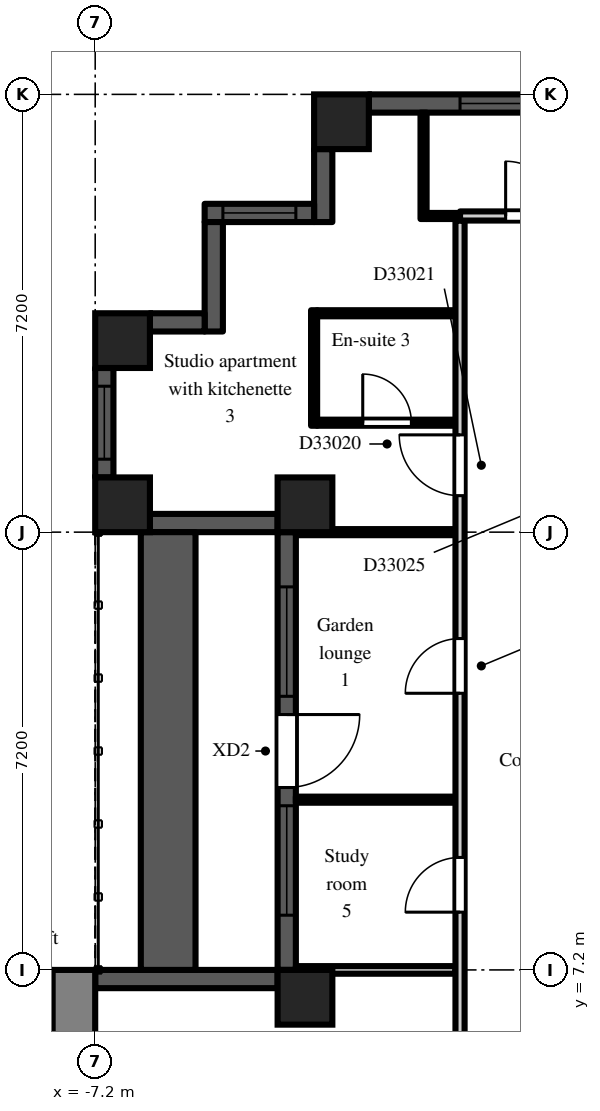
"""IFC4 building model, lengths in metres.
Left out: names, types, materials, properties, quantities, classifications, styles, units other than length and angle.
Written with IfcOpenShell. Run it as: python <this file> out.ifc"""

import sys

from ifc_helpers import new_model, si_unit, direction, frame, frame_2d, origin, origin_2d, place, context, subcontext, project, spatial, rectangle, extrude, element, fill, save


model = new_model("IFC4")
c1 = context("Model", 3, precision=1e-05, world=origin(), true_north=direction((0.0, 1.0)))
c2 = subcontext(c1, "Body", "Model", "MODEL_VIEW")
j1 = project(units=[si_unit("LENGTHUNIT", "METRE"), si_unit("PLANEANGLEUNIT", "RADIAN")], contexts=[c1])
p1 = place(None, origin())
s1 = spatial("IfcSite", under=j1, at=p1, CompositionType="ELEMENT")
p2 = place(p1, origin())
s2 = spatial("IfcBuilding", under=s1, at=p2, CompositionType="ELEMENT")
p3 = place(p2, frame((0.0, 0.0, 231.9)))
s3 = spatial("IfcBuildingStorey", under=s2, at=p3, CompositionType="ELEMENT", Elevation=231.9)
for number, where, z_axis, x_axis in (
    (1, (-6.75, 14.85, 0.0), (0.0, 0.0, 1.0), (1.0, 0.0, 0.0)),
    (2, (-6.75, 17.55, 0.0), (0.0, 0.0, 1.0), (1.0, 0.0, 0.0)),
    (3, (-3.75, 6.75, 0.0), (0.0, 0.0, 1.0), (1.0, 0.0, 0.0)),
    (4, (-3.75, 14.85, 0.0), (0.0, 0.0, 1.0), (1.0, 0.0, 0.0)),
    (5, (-3.15, 21.15, 0.0), (0.0, 0.0, 1.0), (1.0, 0.0, 0.0)),
):
    element("IfcColumn", number, at=place(p3, frame(where, z_axis=z_axis, x_axis=x_axis)), inside=s3, PredefinedType="COLUMN", context=c2, shape_type="SweptSolid", body=[
        extrude(rectangle(XDim=0.9, YDim=0.9, at=origin_2d()), origin(), (0.0, 0.0, 1.0), 3.0),
    ])
p4 = place(p3, frame((2.7, 21.45, 0.0), z_axis=(0.0, 0.0, 1.0), x_axis=(-1.0, 0.0, 0.0)))
e6 = element("IfcWall", 6, at=p4, inside=s3, PredefinedType="SOLIDWALL", context=c2, shape_type="SweptSolid", body=[
    extrude(rectangle(XDim=5.4, YDim=0.3, at=frame_2d((2.7, 0.0))), origin(), (0.0, 0.0, 1.0), 2.3),
])
p5 = place(p4, frame((1.5, 0.0, 0.2)))
e7 = element("IfcOpeningElement", 7, at=p5, cuts=e6, PredefinedType="OPENING", context=c2, shape_type="SweptSolid", body=[
    extrude(rectangle(XDim=2.4, YDim=1.85, at=frame_2d((1.2, 0.925))), frame((0.0, 0.16, 0.0), z_axis=(0.0, -1.0, 0.0), x_axis=(1.0, 0.0, 0.0)), (0.0, 0.0, 1.0), 0.32),
])
p6 = place(p3, frame((-3.45, 20.7, 0.0), z_axis=(0.0, 0.0, 1.0), x_axis=(0.0, -1.0, 0.0)))
e8 = element("IfcWall", 8, at=p6, inside=s3, PredefinedType="SOLIDWALL", context=c2, shape_type="SweptSolid", body=[
    extrude(rectangle(XDim=1.2, YDim=0.3, at=frame_2d((0.6, 0.0))), origin(), (0.0, 0.0, 1.0), 2.6),
])
p7 = place(p3, frame((-3.6, 19.65, 0.0), z_axis=(0.0, 0.0, 1.0), x_axis=(-1.0, 0.0, 0.0)))
e9 = element("IfcWall", 9, at=p7, inside=s3, PredefinedType="SOLIDWALL", context=c2, shape_type="SweptSolid", body=[
    extrude(rectangle(XDim=1.8, YDim=0.3, at=frame_2d((0.9, 0.0))), origin(), (0.0, 0.0, 1.0), 2.6),
])
p8 = place(p7, frame((0.3, 0.0, 0.2)))
e10 = element("IfcOpeningElement", 10, at=p8, cuts=e9, PredefinedType="OPENING", context=c2, shape_type="SweptSolid", body=[
    extrude(rectangle(XDim=1.2, YDim=1.85, at=frame_2d((0.6, 0.925))), frame((0.0, 0.16, 0.0), z_axis=(0.0, -1.0, 0.0), x_axis=(1.0, 0.0, 0.0)), (0.0, 0.0, 1.0), 0.32),
])
p9 = place(p3, frame((-5.25, 19.5, 0.0), z_axis=(0.0, 0.0, 1.0), x_axis=(0.0, -1.0, 0.0)))
e11 = element("IfcWall", 11, at=p9, inside=s3, PredefinedType="SOLIDWALL", context=c2, shape_type="SweptSolid", body=[
    extrude(rectangle(XDim=1.8, YDim=0.3, at=frame_2d((0.9, 0.0))), origin(), (0.0, 0.0, 1.0), 2.6),
])
p10 = place(p3, frame((-5.4, 17.85, 0.0), z_axis=(0.0, 0.0, 1.0), x_axis=(-1.0, 0.0, 0.0)))
e12 = element("IfcWall", 12, at=p10, inside=s3, PredefinedType="SOLIDWALL", context=c2, shape_type="SweptSolid", body=[
    extrude(rectangle(XDim=0.9, YDim=0.3, at=frame_2d((0.45, 0.0))), origin(), (0.0, 0.0, 1.0), 2.6),
])
p11 = place(p3, frame((-7.05, 17.1, 0.0), z_axis=(0.0, 0.0, 1.0), x_axis=(0.0, -1.0, 0.0)))
e13 = element("IfcWall", 13, at=p11, inside=s3, PredefinedType="SOLIDWALL", context=c2, shape_type="SweptSolid", body=[
    extrude(rectangle(XDim=1.8, YDim=0.3, at=frame_2d((0.9, 0.0))), origin(), (0.0, 0.0, 1.0), 2.3),
])
p12 = place(p11, frame((0.3, 0.0, 0.2)))
e14 = element("IfcOpeningElement", 14, at=p12, cuts=e13, PredefinedType="OPENING", context=c2, shape_type="SweptSolid", body=[
    extrude(rectangle(XDim=1.2, YDim=1.85, at=frame_2d((0.6, 0.925))), frame((0.0, 0.16, 0.0), z_axis=(0.0, -1.0, 0.0), x_axis=(1.0, 0.0, 0.0)), (0.0, 0.0, 1.0), 0.32),
])
p13 = place(p3, frame((-6.3, 14.55, 0.0), z_axis=(0.0, 0.0, 1.0), x_axis=(1.0, 0.0, 0.0)))
e15 = element("IfcWall", 15, at=p13, inside=s3, PredefinedType="SOLIDWALL", context=c2, shape_type="SweptSolid", body=[
    extrude(rectangle(XDim=2.1, YDim=0.3, at=frame_2d((1.05, 0.0))), origin(), (0.0, 0.0, 1.0), 2.3),
])
p14 = place(p3, frame((-4.05, 14.4, 0.0), z_axis=(0.0, 0.0, 1.0), x_axis=(0.0, -1.0, 0.0)))
e16 = element("IfcWall", 16, at=p14, inside=s3, PredefinedType="SOLIDWALL", context=c2, shape_type="SweptSolid", body=[
    extrude(rectangle(XDim=7.2, YDim=0.3, at=frame_2d((3.6, 0.0))), origin(), (0.0, 0.0, 1.0), 2.3),
])
p15 = place(p14, frame((3.0, 0.0, 0.0)))
e17 = element("IfcOpeningElement", 17, at=p15, cuts=e16, PredefinedType="OPENING", context=c2, shape_type="SweptSolid", body=[
    extrude(rectangle(XDim=1.2, YDim=2.05, at=frame_2d((0.6, 1.025))), frame((0.0, 0.16, 0.0), z_axis=(0.0, -1.0, 0.0), x_axis=(1.0, 0.0, 0.0)), (0.0, 0.0, 1.0), 0.32),
])
p16 = place(p14, frame((0.9, 0.0, 0.2)))
e18 = element("IfcOpeningElement", 18, at=p16, cuts=e16, PredefinedType="OPENING", context=c2, shape_type="SweptSolid", body=[
    extrude(rectangle(XDim=1.8, YDim=1.85, at=frame_2d((0.9, 0.925))), frame((0.0, 0.16, 0.0), z_axis=(0.0, -1.0, 0.0), x_axis=(1.0, 0.0, 0.0)), (0.0, 0.0, 1.0), 0.32),
])
p17 = place(p14, frame((4.5, 0.0, 0.2)))
e19 = element("IfcOpeningElement", 19, at=p17, cuts=e16, PredefinedType="OPENING", context=c2, shape_type="SweptSolid", body=[
    extrude(rectangle(XDim=1.8, YDim=1.85, at=frame_2d((0.9, 0.925))), frame((0.0, 0.16, 0.0), z_axis=(0.0, -1.0, 0.0), x_axis=(1.0, 0.0, 0.0)), (0.0, 0.0, 1.0), 0.32),
])
p18 = place(p3, frame((-4.2, 7.05, 0.0), z_axis=(0.0, 0.0, 1.0), x_axis=(-1.0, 0.0, 0.0)))
e20 = element("IfcWall", 20, at=p18, inside=s3, PredefinedType="SOLIDWALL", context=c2, shape_type="SweptSolid", body=[
    extrude(rectangle(XDim=3.0, YDim=0.3, at=frame_2d((1.5, 0.0))), origin(), (0.0, 0.0, 1.0), 2.3),
])
p19 = place(p3, frame((-6.0, 7.2, 0.0), z_axis=(0.0, 0.0, 1.0), x_axis=(0.0, 1.0, 0.0)))
e21 = element("IfcWall", 21, at=p19, inside=s3, PredefinedType="PARAPET", context=c2, shape_type="SweptSolid", body=[
    extrude(rectangle(XDim=7.2, YDim=0.9, at=frame_2d((3.6, 0.0))), origin(), (0.0, 0.0, 1.0), 0.8),
])
p20 = place(p3, frame((-7.55, -7.2, 0.0), z_axis=(0.0, 0.0, 1.0), x_axis=(0.0, 1.0, 0.0)))
e22 = element("IfcWall", 22, at=p20, inside=s3, PredefinedType="SHEAR", context=c2, shape_type="SweptSolid", body=[
    extrude(rectangle(XDim=14.4, YDim=0.7, at=frame_2d((7.2, 0.0))), origin(), (0.0, 0.0, 1.0), 2.6),
])
p21 = place(p20, frame((6.0, 0.0, 0.0)))
e23 = element("IfcOpeningElement", 23, at=p21, cuts=e22, PredefinedType="OPENING", context=c2, shape_type="SweptSolid", body=[
    extrude(rectangle(XDim=2.4, YDim=2.2, at=frame_2d((1.2, 1.1))), frame((0.0, 0.36, 0.0), z_axis=(0.0, -1.0, 0.0), x_axis=(1.0, 0.0, 0.0)), (0.0, 0.0, 1.0), 0.72),
])
p22 = place(p3, frame((-3.9, 7.2, 0.0), z_axis=(0.0, 0.0, 1.0), x_axis=(1.0, 0.0, 0.0)))
e24 = element("IfcWall", 24, at=p22, inside=s3, PredefinedType="PARTITIONING", context=c2, shape_type="SweptSolid", body=[
    extrude(rectangle(XDim=2.625, YDim=0.125, at=frame_2d((1.312, 0.0))), origin(), (0.0, 0.0, 1.0), 2.6),
])
for number, where, z_axis, x_axis in (
    (25, (-3.9, 10.0, 0.0), (0.0, 0.0, 1.0), (1.0, 0.0, 0.0)),
    (26, (-3.9, 14.4, 0.0), (0.0, 0.0, 1.0), (1.0, 0.0, 0.0)),
):
    element("IfcWall", number, at=place(p3, frame(where, z_axis=z_axis, x_axis=x_axis)), inside=s3, PredefinedType="PARTITIONING", context=c2, shape_type="SweptSolid", body=[
        extrude(rectangle(XDim=2.625, YDim=0.1, at=frame_2d((1.312, 0.0))), origin(), (0.0, 0.0, 1.0), 2.6),
    ])
p23 = place(p3, frame((-3.6, 16.15, 0.0), z_axis=(0.0, 0.0, 1.0), x_axis=(0.0, 1.0, 0.0)))
e27 = element("IfcWall", 27, at=p23, inside=s3, PredefinedType="PARTITIONING", context=c2, shape_type="SweptSolid", body=[
    extrude(rectangle(XDim=1.9, YDim=0.1, at=frame_2d((0.95, 0.0))), origin(), (0.0, 0.0, 1.0), 2.6),
])
p24 = place(p3, frame((-3.55, 16.2, 0.0), z_axis=(0.0, 0.0, 1.0), x_axis=(1.0, 0.0, 0.0)))
e28 = element("IfcWall", 28, at=p24, inside=s3, PredefinedType="PARTITIONING", context=c2, shape_type="SweptSolid", body=[
    extrude(rectangle(XDim=2.275, YDim=0.1, at=frame_2d((1.138, 0.0))), origin(), (0.0, 0.0, 1.0), 2.6),
])
p25 = place(p24, frame((0.75, 0.0, 0.0)))
e29 = element("IfcOpeningElement", 29, at=p25, cuts=e28, PredefinedType="OPENING", context=c2, shape_type="SweptSolid", body=[
    extrude(rectangle(XDim=0.8, YDim=2.1, at=frame_2d((0.4, 1.05))), frame((0.0, 0.06, 0.0), z_axis=(0.0, -1.0, 0.0), x_axis=(1.0, 0.0, 0.0)), (0.0, 0.0, 1.0), 0.12),
])
p26 = place(p3, frame((-3.55, 18.0, 0.0), z_axis=(0.0, 0.0, 1.0), x_axis=(1.0, 0.0, 0.0)))
e30 = element("IfcWall", 30, at=p26, inside=s3, PredefinedType="PARTITIONING", context=c2, shape_type="SweptSolid", body=[
    extrude(rectangle(XDim=2.275, YDim=0.1, at=frame_2d((1.138, 0.0))), origin(), (0.0, 0.0, 1.0), 2.6),
])
p27 = place(p3, frame((-1.8, 19.55, 0.0), z_axis=(0.0, 0.0, 1.0), x_axis=(0.0, 1.0, 0.0)))
e31 = element("IfcWall", 31, at=p27, inside=s3, PredefinedType="PARTITIONING", context=c2, shape_type="SweptSolid", body=[
    extrude(rectangle(XDim=1.75, YDim=0.1, at=frame_2d((0.875, 0.0))), origin(), (0.0, 0.0, 1.0), 2.6),
])
p28 = place(p3, frame((-1.75, 19.6, 0.0), z_axis=(0.0, 0.0, 1.0), x_axis=(1.0, 0.0, 0.0)))
e32 = element("IfcWall", 32, at=p28, inside=s3, PredefinedType="PARTITIONING", context=c2, shape_type="SweptSolid", body=[
    extrude(rectangle(XDim=0.55, YDim=0.1, at=frame_2d((0.275, 0.0))), origin(), (0.0, 0.0, 1.0), 2.6),
])
p29 = place(p3, frame((-1.2, 1.275, 0.0), z_axis=(0.0, 0.0, 1.0), x_axis=(0.0, 1.0, 0.0)))
e33 = element("IfcWall", 33, at=p29, inside=s3, PredefinedType="PARTITIONING", context=c2, shape_type="SweptSolid", body=[
    extrude(rectangle(XDim=18.25, YDim=0.15, at=frame_2d((9.125, 0.0))), origin(), (0.0, 0.0, 1.0), 2.6),
])
p30 = place(p29, frame((0.675, 0.0, 0.0)))
e34 = element("IfcOpeningElement", 34, at=p30, cuts=e33, PredefinedType="OPENING", context=c2, shape_type="SweptSolid", body=[
    extrude(rectangle(XDim=0.9, YDim=2.1, at=frame_2d((0.45, 1.05))), frame((0.0, 0.085, 0.0), z_axis=(0.0, -1.0, 0.0), x_axis=(1.0, 0.0, 0.0)), (0.0, 0.0, 1.0), 0.17),
])
p31 = place(p29, frame((3.675, 0.0, 0.0)))
e35 = element("IfcOpeningElement", 35, at=p31, cuts=e33, PredefinedType="OPENING", context=c2, shape_type="SweptSolid", body=[
    extrude(rectangle(XDim=0.9, YDim=2.1, at=frame_2d((0.45, 1.05))), frame((0.0, 0.085, 0.0), z_axis=(0.0, -1.0, 0.0), x_axis=(1.0, 0.0, 0.0)), (0.0, 0.0, 1.0), 0.17),
])
p32 = place(p29, frame((6.875, 0.0, 0.0)))
e36 = element("IfcOpeningElement", 36, at=p32, cuts=e33, PredefinedType="OPENING", context=c2, shape_type="SweptSolid", body=[
    extrude(rectangle(XDim=0.9, YDim=2.1, at=frame_2d((0.45, 1.05))), frame((0.0, 0.085, 0.0), z_axis=(0.0, -1.0, 0.0), x_axis=(1.0, 0.0, 0.0)), (0.0, 0.0, 1.0), 0.17),
])
p33 = place(p29, frame((10.475, 0.0, 0.0)))
e37 = element("IfcOpeningElement", 37, at=p33, cuts=e33, PredefinedType="OPENING", context=c2, shape_type="SweptSolid", body=[
    extrude(rectangle(XDim=0.9, YDim=2.1, at=frame_2d((0.45, 1.05))), frame((0.0, 0.085, 0.0), z_axis=(0.0, -1.0, 0.0), x_axis=(1.0, 0.0, 0.0)), (0.0, 0.0, 1.0), 0.17),
])
p34 = place(p29, frame((13.725, 0.0, 0.0)))
e38 = element("IfcOpeningElement", 38, at=p34, cuts=e33, PredefinedType="OPENING", context=c2, shape_type="SweptSolid", body=[
    extrude(rectangle(XDim=1.0, YDim=2.1, at=frame_2d((0.5, 1.05))), frame((0.0, 0.085, 0.0), z_axis=(0.0, -1.0, 0.0), x_axis=(1.0, 0.0, 0.0)), (0.0, 0.0, 1.0), 0.17),
])
p35 = place(p3, frame((-1.2, 19.6, 0.0), z_axis=(0.0, 0.0, 1.0), x_axis=(1.0, 0.0, 0.0)))
e39 = element("IfcWall", 39, at=p35, inside=s3, PredefinedType="PARTITIONING", context=c2, shape_type="SweptSolid", body=[
    extrude(rectangle(XDim=2.4, YDim=0.15, at=frame_2d((1.2, 0.0))), origin(), (0.0, 0.0, 1.0), 2.6),
])
p36 = place(p35, frame((0.75, 0.0, 0.0)))
e40 = element("IfcOpeningElement", 40, at=p36, cuts=e39, PredefinedType="OPENING", context=c2, shape_type="SweptSolid", body=[
    extrude(rectangle(XDim=0.9, YDim=2.1, at=frame_2d((0.45, 1.05))), frame((0.0, 0.085, 0.0), z_axis=(0.0, -1.0, 0.0), x_axis=(1.0, 0.0, 0.0)), (0.0, 0.0, 1.0), 0.17),
])
p37 = place(p5, origin())
e41 = element("IfcWindow", 41, at=p37, inside=s3, PartitioningType="SINGLE_PANEL", PredefinedType="WINDOW", context=c2, shape_type="SweptSolid", body=[
    extrude(rectangle(XDim=2.4, YDim=1.85, at=frame_2d((1.2, 0.925))), frame((0.0, 0.03, 0.0), z_axis=(0.0, -1.0, 0.0), x_axis=(1.0, 0.0, 0.0)), (0.0, 0.0, 1.0), 0.06),
])
fill(e7, e41)
p38 = place(p8, origin())
e42 = element("IfcWindow", 42, at=p38, inside=s3, PartitioningType="SINGLE_PANEL", PredefinedType="WINDOW", context=c2, shape_type="SweptSolid", body=[
    extrude(rectangle(XDim=1.2, YDim=1.85, at=frame_2d((0.6, 0.925))), frame((0.0, 0.03, 0.0), z_axis=(0.0, -1.0, 0.0), x_axis=(1.0, 0.0, 0.0)), (0.0, 0.0, 1.0), 0.06),
])
fill(e10, e42)
p39 = place(p12, origin())
e43 = element("IfcWindow", 43, at=p39, inside=s3, PartitioningType="SINGLE_PANEL", PredefinedType="WINDOW", context=c2, shape_type="SweptSolid", body=[
    extrude(rectangle(XDim=1.2, YDim=1.85, at=frame_2d((0.6, 0.925))), frame((0.0, 0.03, 0.0), z_axis=(0.0, -1.0, 0.0), x_axis=(1.0, 0.0, 0.0)), (0.0, 0.0, 1.0), 0.06),
])
fill(e14, e43)
p40 = place(p15, origin())
e44 = element("IfcDoor", 44, at=p40, inside=s3, OperationType="SINGLE_SWING_LEFT", PredefinedType="DOOR", context=c2, shape_type="SweptSolid", body=[
    extrude(rectangle(XDim=1.2, YDim=2.05, at=frame_2d((0.6, 1.025))), frame((0.0, 0.025, 0.0), z_axis=(0.0, -1.0, 0.0), x_axis=(1.0, 0.0, 0.0)), (0.0, 0.0, 1.0), 0.05),
])
fill(e17, e44)
p41 = place(p16, origin())
e45 = element("IfcWindow", 45, at=p41, inside=s3, PartitioningType="SINGLE_PANEL", PredefinedType="WINDOW", context=c2, shape_type="SweptSolid", body=[
    extrude(rectangle(XDim=1.8, YDim=1.85, at=frame_2d((0.9, 0.925))), frame((0.0, 0.03, 0.0), z_axis=(0.0, -1.0, 0.0), x_axis=(1.0, 0.0, 0.0)), (0.0, 0.0, 1.0), 0.06),
])
fill(e18, e45)
p42 = place(p17, origin())
e46 = element("IfcWindow", 46, at=p42, inside=s3, PartitioningType="SINGLE_PANEL", PredefinedType="WINDOW", context=c2, shape_type="SweptSolid", body=[
    extrude(rectangle(XDim=1.8, YDim=1.85, at=frame_2d((0.9, 0.925))), frame((0.0, 0.03, 0.0), z_axis=(0.0, -1.0, 0.0), x_axis=(1.0, 0.0, 0.0)), (0.0, 0.0, 1.0), 0.06),
])
fill(e19, e46)
p43 = place(p36, origin())
e47 = element("IfcDoor", 47, at=p43, inside=s3, OperationType="SINGLE_SWING_LEFT", PredefinedType="DOOR", context=c2, shape_type="SweptSolid", body=[
    extrude(rectangle(XDim=0.9, YDim=2.1, at=frame_2d((0.45, 1.05))), frame((0.0, 0.025, 0.0), z_axis=(0.0, -1.0, 0.0), x_axis=(1.0, 0.0, 0.0)), (0.0, 0.0, 1.0), 0.05),
])
fill(e40, e47)
p44 = place(p32, origin())
e48 = element("IfcDoor", 48, at=p44, inside=s3, OperationType="SINGLE_SWING_LEFT", PredefinedType="DOOR", context=c2, shape_type="SweptSolid", body=[
    extrude(rectangle(XDim=0.9, YDim=2.1, at=frame_2d((0.45, 1.05))), frame((0.0, 0.025, 0.0), z_axis=(0.0, -1.0, 0.0), x_axis=(1.0, 0.0, 0.0)), (0.0, 0.0, 1.0), 0.05),
])
fill(e36, e48)
p45 = place(p33, origin())
e49 = element("IfcDoor", 49, at=p45, inside=s3, OperationType="SINGLE_SWING_LEFT", PredefinedType="DOOR", context=c2, shape_type="SweptSolid", body=[
    extrude(rectangle(XDim=0.9, YDim=2.1, at=frame_2d((0.45, 1.05))), frame((0.0, 0.025, 0.0), z_axis=(0.0, -1.0, 0.0), x_axis=(1.0, 0.0, 0.0)), (0.0, 0.0, 1.0), 0.05),
])
fill(e37, e49)
p46 = place(p25, origin())
e50 = element("IfcDoor", 50, at=p46, inside=s3, OperationType="SINGLE_SWING_LEFT", PredefinedType="DOOR", context=c2, shape_type="SweptSolid", body=[
    extrude(rectangle(XDim=0.8, YDim=2.1, at=frame_2d((0.4, 1.05))), frame((0.0, 0.025, 0.0), z_axis=(0.0, -1.0, 0.0), x_axis=(1.0, 0.0, 0.0)), (0.0, 0.0, 1.0), 0.05),
])
fill(e29, e50)
p47 = place(p34, origin())
e51 = element("IfcDoor", 51, at=p47, inside=s3, OperationType="SINGLE_SWING_RIGHT", PredefinedType="DOOR", context=c2, shape_type="SweptSolid", body=[
    extrude(rectangle(XDim=1.0, YDim=2.1, at=frame_2d((0.5, 1.05))), frame((0.0, 0.025, 0.0), z_axis=(0.0, -1.0, 0.0), x_axis=(1.0, 0.0, 0.0)), (0.0, 0.0, 1.0), 0.05),
])
fill(e38, e51)
save(model, sys.argv[1])
